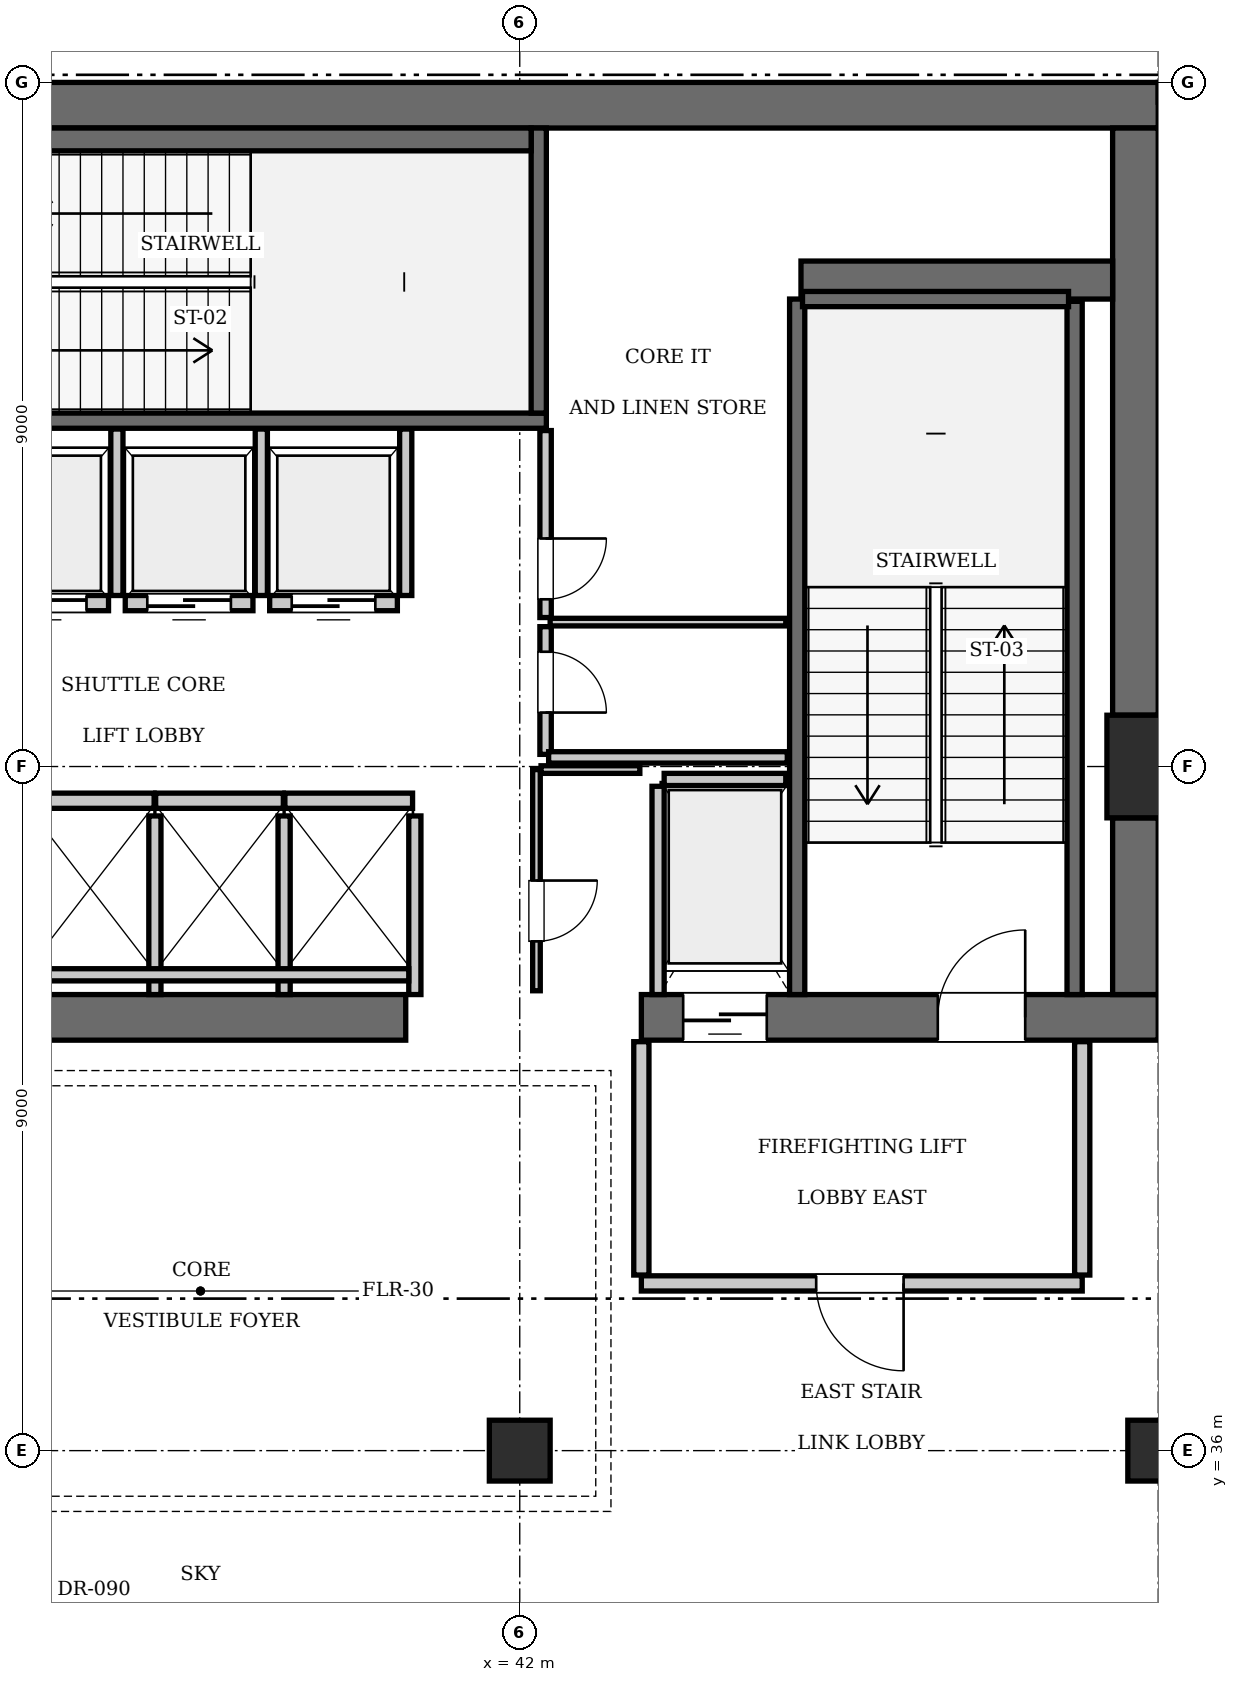
"""IFC4 building model, lengths in metres.
Left out: names, types, materials, properties, quantities, classifications, styles, units other than length and angle.
Written with IfcOpenShell. Run it as: python <this file> out.ifc"""

import sys

from ifc_helpers import new_model, si_unit, direction, frame, frame_2d, origin, origin_2d, place, context, subcontext, project, spatial, rectangle, extrude, element, fill, save


model = new_model("IFC4")
c1 = context("Model", 3, precision=1e-05, world=origin(), true_north=direction((0.0, 1.0)))
c2 = subcontext(c1, "Body", "Model", "MODEL_VIEW")
j1 = project(units=[si_unit("LENGTHUNIT", "METRE"), si_unit("PLANEANGLEUNIT", "RADIAN")], contexts=[c1])
p1 = place(None, origin())
s1 = spatial("IfcSite", under=j1, at=p1, CompositionType="ELEMENT")
p2 = place(p1, origin())
s2 = spatial("IfcBuilding", under=s1, at=p2, CompositionType="ELEMENT")
p3 = place(p2, frame((0.0, 0.0, 345.1)))
s3 = spatial("IfcBuildingStorey", under=s2, at=p3, CompositionType="ELEMENT", Elevation=345.1)
p4 = place(p3, frame((50.4, 45.0, 0.0), z_axis=(0.0, 0.0, 1.0), x_axis=(1.0, 0.0, 0.0)))
e1 = element("IfcColumn", 1, at=p4, inside=s3, PredefinedType="COLUMN", context=c2, shape_type="SweptSolid", body=[
    extrude(rectangle(XDim=1.35, YDim=1.35, at=origin_2d()), origin(), (0.0, 0.0, 1.0), 4.55),
])
p5 = place(p3, frame((25.2, 53.7, 0.0), z_axis=(0.0, 0.0, 1.0), x_axis=(1.0, 0.0, 0.0)))
e2 = element("IfcWall", 2, at=p5, inside=s3, PredefinedType="SHEAR", context=c2, shape_type="SweptSolid", body=[
    extrude(rectangle(XDim=25.2, YDim=0.6, at=frame_2d((12.6, 0.0))), origin(), (0.0, 0.0, 1.0), 4.55),
])
p6 = place(p3, frame((35.1, 41.7, 0.0), z_axis=(0.0, 0.0, 1.0), x_axis=(1.0, 0.0, 0.0)))
e3 = element("IfcWall", 3, at=p6, inside=s3, PredefinedType="SHEAR", context=c2, shape_type="SweptSolid", body=[
    extrude(rectangle(XDim=5.4, YDim=0.6, at=frame_2d((2.7, 0.0))), origin(), (0.0, 0.0, 1.0), 4.55),
])
p7 = place(p3, frame((43.6, 41.7, 0.0), z_axis=(0.0, 0.0, 1.0), x_axis=(1.0, 0.0, 0.0)))
e4 = element("IfcWall", 4, at=p7, inside=s3, PredefinedType="SHEAR", context=c2, shape_type="SweptSolid", body=[
    extrude(rectangle(XDim=6.8, YDim=0.6, at=frame_2d((3.4, 0.0))), origin(), (0.0, 0.0, 1.0), 4.55),
])
p8 = place(p7, frame((3.9, 0.0, 0.0)))
e5 = element("IfcOpeningElement", 5, at=p8, cuts=e4, PredefinedType="OPENING", context=c2, shape_type="SweptSolid", body=[
    extrude(rectangle(XDim=1.15, YDim=2.15, at=frame_2d((0.575, 1.075))), frame((0.0, 0.31, 0.0), z_axis=(0.0, -1.0, 0.0), x_axis=(1.0, 0.0, 0.0)), (0.0, 0.0, 1.0), 0.62),
])
p9 = place(p7, frame((0.55, 0.0, 0.0)))
e6 = element("IfcOpeningElement", 6, at=p9, cuts=e4, PredefinedType="OPENING", context=c2, shape_type="SweptSolid", body=[
    extrude(rectangle(XDim=1.1, YDim=2.2, at=frame_2d((0.55, 1.1))), frame((0.0, 0.31, 0.0), z_axis=(0.0, -1.0, 0.0), x_axis=(1.0, 0.0, 0.0)), (0.0, 0.0, 1.0), 0.62),
])
p10 = place(p3, frame((50.1, 42.0, 0.0), z_axis=(0.0, 0.0, 1.0), x_axis=(0.0, 1.0, 0.0)))
e7 = element("IfcWall", 7, at=p10, inside=s3, PredefinedType="SHEAR", context=c2, shape_type="SweptSolid", body=[
    extrude(rectangle(XDim=2.325, YDim=0.6, at=frame_2d((1.163, 0.0))), origin(), (0.0, 0.0, 1.0), 4.55),
])
p11 = place(p3, frame((50.1, 45.675, 0.0), z_axis=(0.0, 0.0, 1.0), x_axis=(0.0, 1.0, 0.0)))
e8 = element("IfcWall", 8, at=p11, inside=s3, PredefinedType="SHEAR", context=c2, shape_type="SweptSolid", body=[
    extrude(rectangle(XDim=7.725, YDim=0.6, at=frame_2d((3.862, 0.0))), origin(), (0.0, 0.0, 1.0), 4.55),
])
p12 = place(p3, frame((45.7, 51.4, 0.0), z_axis=(0.0, 0.0, 1.0), x_axis=(1.0, 0.0, 0.0)))
e9 = element("IfcWall", 9, at=p12, inside=s3, PredefinedType="SHEAR", context=c2, shape_type="SweptSolid", body=[
    extrude(rectangle(XDim=4.1, YDim=0.5, at=frame_2d((2.05, 0.0))), origin(), (0.0, 0.0, 1.0), 4.55),
])
for number, where, z_axis, x_axis in (
    (10, (42.0, 36.0, 0.0), (0.0, 0.0, 1.0), (1.0, 0.0, 0.0)),
    (11, (50.4, 36.0, 0.0), (0.0, 0.0, 1.0), (1.0, 0.0, 0.0)),
):
    element("IfcColumn", number, at=place(p3, frame(where, z_axis=z_axis, x_axis=x_axis)), inside=s3, PredefinedType="COLUMN", context=c2, shape_type="SweptSolid", body=[
        extrude(rectangle(XDim=0.8, YDim=0.8, at=origin_2d()), origin(), (0.0, 0.0, 1.0), 4.55),
    ])
p13 = place(p3, frame((33.25, 49.55, 0.0), z_axis=(0.0, 0.0, 1.0), x_axis=(1.0, 0.0, 0.0)))
e12 = element("IfcWall", 12, at=p13, inside=s3, PredefinedType="SOLIDWALL", context=c2, shape_type="SweptSolid", body=[
    extrude(rectangle(XDim=9.1, YDim=0.2, at=frame_2d((4.55, 0.0))), origin(), (0.0, 0.0, 1.0), 4.31),
])
p14 = place(p3, frame((42.25, 49.65, 0.0), z_axis=(0.0, 0.0, 1.0), x_axis=(0.0, 1.0, 0.0)))
e13 = element("IfcWall", 13, at=p14, inside=s3, PredefinedType="SOLIDWALL", context=c2, shape_type="SweptSolid", body=[
    extrude(rectangle(XDim=3.75, YDim=0.2, at=frame_2d((1.875, 0.0))), origin(), (0.0, 0.0, 1.0), 4.31),
])
p15 = place(p3, frame((33.45, 53.25, 0.0), z_axis=(0.0, 0.0, 1.0), x_axis=(1.0, 0.0, 0.0)))
e14 = element("IfcWall", 14, at=p15, inside=s3, PredefinedType="SOLIDWALL", context=c2, shape_type="SweptSolid", body=[
    extrude(rectangle(XDim=8.7, YDim=0.3, at=frame_2d((4.35, 0.0))), origin(), (0.0, 0.0, 1.0), 4.31),
])
p16 = place(p3, frame((45.65, 42.0, 0.0), z_axis=(0.0, 0.0, 1.0), x_axis=(0.0, 1.0, 0.0)))
e15 = element("IfcWall", 15, at=p16, inside=s3, PredefinedType="SOLIDWALL", context=c2, shape_type="SweptSolid", body=[
    extrude(rectangle(XDim=9.15, YDim=0.2, at=frame_2d((4.575, 0.0))), origin(), (0.0, 0.0, 1.0), 4.31),
])
p17 = place(p3, frame((49.3, 42.0, 0.0), z_axis=(0.0, 0.0, 1.0), x_axis=(0.0, 1.0, 0.0)))
e16 = element("IfcWall", 16, at=p17, inside=s3, PredefinedType="SOLIDWALL", context=c2, shape_type="SweptSolid", body=[
    extrude(rectangle(XDim=9.12, YDim=0.2, at=frame_2d((4.56, 0.0))), origin(), (0.0, 0.0, 1.0), 4.31),
])
p18 = place(p3, frame((45.72, 51.15, 0.0), z_axis=(0.0, 0.0, 1.0), x_axis=(1.0, 0.0, 0.0)))
e17 = element("IfcWall", 17, at=p18, inside=s3, PredefinedType="SOLIDWALL", context=c2, shape_type="SweptSolid", body=[
    extrude(rectangle(XDim=3.5, YDim=0.2, at=frame_2d((1.75, 0.0))), origin(), (0.0, 0.0, 1.0), 4.31),
])
for number, where, z_axis, x_axis in (
    (18, (35.51, 44.55, 0.0), (0.0, 0.0, 1.0), (1.0, 0.0, 0.0)),
    (19, (37.21, 44.55, 0.0), (0.0, 0.0, 1.0), (1.0, 0.0, 0.0)),
):
    element("IfcWall", number, at=place(p3, frame(where, z_axis=z_axis, x_axis=x_axis)), inside=s3, PredefinedType="SOLIDWALL", context=c2, shape_type="SweptSolid", body=[
        extrude(rectangle(XDim=1.68, YDim=0.2, at=frame_2d((0.84, 0.0))), origin(), (0.0, 0.0, 1.0), 4.31),
    ])
p19 = place(p3, frame((38.91, 44.55, 0.0), z_axis=(0.0, 0.0, 1.0), x_axis=(1.0, 0.0, 0.0)))
e20 = element("IfcWall", 20, at=p19, inside=s3, PredefinedType="SOLIDWALL", context=c2, shape_type="SweptSolid", body=[
    extrude(rectangle(XDim=1.68, YDim=0.2, at=frame_2d((0.84, 0.0))), origin(), (0.0, 0.0, 1.0), 4.31),
])
p20 = place(p3, frame((34.91, 47.15, 0.0), z_axis=(0.0, 0.0, 1.0), x_axis=(1.0, 0.0, 0.0)))
e21 = element("IfcWall", 21, at=p20, inside=s3, PredefinedType="SOLIDWALL", context=c2, shape_type="SweptSolid", body=[
    extrude(rectangle(XDim=1.68, YDim=0.2, at=frame_2d((0.84, 0.0))), origin(), (0.0, 0.0, 1.0), 4.31),
])
p21 = place(p20, frame((0.29, 0.0, 0.0)))
e22 = element("IfcOpeningElement", 22, at=p21, cuts=e21, PredefinedType="OPENING", context=c2, shape_type="SweptSolid", body=[
    extrude(rectangle(XDim=1.1, YDim=2.2, at=frame_2d((0.55, 1.1))), frame((0.0, 0.11, 0.0), z_axis=(0.0, -1.0, 0.0), x_axis=(1.0, 0.0, 0.0)), (0.0, 0.0, 1.0), 0.22),
])
p22 = place(p3, frame((36.81, 47.15, 0.0), z_axis=(0.0, 0.0, 1.0), x_axis=(1.0, 0.0, 0.0)))
e23 = element("IfcWall", 23, at=p22, inside=s3, PredefinedType="SOLIDWALL", context=c2, shape_type="SweptSolid", body=[
    extrude(rectangle(XDim=1.68, YDim=0.2, at=frame_2d((0.84, 0.0))), origin(), (0.0, 0.0, 1.0), 4.31),
])
p23 = place(p22, frame((0.29, 0.0, 0.0)))
e24 = element("IfcOpeningElement", 24, at=p23, cuts=e23, PredefinedType="OPENING", context=c2, shape_type="SweptSolid", body=[
    extrude(rectangle(XDim=1.1, YDim=2.2, at=frame_2d((0.55, 1.1))), frame((0.0, 0.11, 0.0), z_axis=(0.0, -1.0, 0.0), x_axis=(1.0, 0.0, 0.0)), (0.0, 0.0, 1.0), 0.22),
])
p24 = place(p3, frame((38.71, 47.15, 0.0), z_axis=(0.0, 0.0, 1.0), x_axis=(1.0, 0.0, 0.0)))
e25 = element("IfcWall", 25, at=p24, inside=s3, PredefinedType="SOLIDWALL", context=c2, shape_type="SweptSolid", body=[
    extrude(rectangle(XDim=1.68, YDim=0.2, at=frame_2d((0.84, 0.0))), origin(), (0.0, 0.0, 1.0), 4.31),
])
p25 = place(p24, frame((0.29, 0.0, 0.0)))
e26 = element("IfcOpeningElement", 26, at=p25, cuts=e25, PredefinedType="OPENING", context=c2, shape_type="SweptSolid", body=[
    extrude(rectangle(XDim=1.1, YDim=2.2, at=frame_2d((0.55, 1.1))), frame((0.0, 0.11, 0.0), z_axis=(0.0, -1.0, 0.0), x_axis=(1.0, 0.0, 0.0)), (0.0, 0.0, 1.0), 0.22),
])
p26 = place(p3, frame((43.9, 44.83, 0.0), z_axis=(0.0, 0.0, 1.0), x_axis=(1.0, 0.0, 0.0)))
e27 = element("IfcWall", 27, at=p26, inside=s3, PredefinedType="SOLIDWALL", context=c2, shape_type="SweptSolid", body=[
    extrude(rectangle(XDim=1.6, YDim=0.16, at=frame_2d((0.8, 0.0))), origin(), (0.0, 0.0, 1.0), 4.31),
])
p27 = place(p3, frame((43.82, 42.0, 0.0), z_axis=(0.0, 0.0, 1.0), x_axis=(0.0, 1.0, 0.0)))
e28 = element("IfcWall", 28, at=p27, inside=s3, PredefinedType="SOLIDWALL", context=c2, shape_type="SweptSolid", body=[
    extrude(rectangle(XDim=2.74, YDim=0.16, at=frame_2d((1.37, 0.0))), origin(), (0.0, 0.0, 1.0), 4.31),
])
for number, where, z_axis, x_axis in (
    (29, (37.2, 42.0, 0.0), (0.0, 0.0, 1.0), (0.0, 1.0, 0.0)),
    (30, (38.9, 42.0, 0.0), (0.0, 0.0, 1.0), (0.0, 1.0, 0.0)),
    (31, (40.62, 42.0, 0.0), (0.0, 0.0, 1.0), (0.0, 1.0, 0.0)),
):
    element("IfcWall", number, at=place(p3, frame(where, z_axis=z_axis, x_axis=x_axis)), inside=s3, PredefinedType="SOLIDWALL", context=c2, shape_type="SweptSolid", body=[
        extrude(rectangle(XDim=2.35, YDim=0.16, at=frame_2d((1.175, 0.0))), origin(), (0.0, 0.0, 1.0), 4.31),
    ])
p28 = place(p3, frame((35.52, 42.26, 0.0), z_axis=(0.0, 0.0, 1.0), x_axis=(1.0, 0.0, 0.0)))
e32 = element("IfcWall", 32, at=p28, inside=s3, PredefinedType="SOLIDWALL", context=c2, shape_type="SweptSolid", body=[
    extrude(rectangle(XDim=5.02, YDim=0.16, at=frame_2d((2.51, 0.0))), origin(), (0.0, 0.0, 1.0), 4.31),
])
for number, where, z_axis, x_axis in (
    (33, (36.7, 47.25, 0.0), (0.0, 0.0, 1.0), (0.0, 1.0, 0.0)),
    (34, (38.6, 47.25, 0.0), (0.0, 0.0, 1.0), (0.0, 1.0, 0.0)),
    (35, (40.5, 47.25, 0.0), (0.0, 0.0, 1.0), (0.0, 1.0, 0.0)),
):
    element("IfcWall", number, at=place(p3, frame(where, z_axis=z_axis, x_axis=x_axis)), inside=s3, PredefinedType="SOLIDWALL", context=c2, shape_type="SweptSolid", body=[
        extrude(rectangle(XDim=2.19, YDim=0.16, at=frame_2d((1.095, 0.0))), origin(), (0.0, 0.0, 1.0), 4.31),
    ])
p29 = place(p3, frame((43.6, 38.2, 0.0), z_axis=(0.0, 0.0, 1.0), x_axis=(1.0, 0.0, 0.0)))
e36 = element("IfcWall", 36, at=p29, inside=s3, PredefinedType="PARTITIONING", context=c2, shape_type="SweptSolid", body=[
    extrude(rectangle(XDim=5.8, YDim=0.2, at=frame_2d((2.9, 0.0))), origin(), (0.0, 0.0, 1.0), 4.31),
])
p30 = place(p29, frame((2.3, 0.0, 0.0)))
e37 = element("IfcOpeningElement", 37, at=p30, cuts=e36, PredefinedType="OPENING", context=c2, shape_type="SweptSolid", body=[
    extrude(rectangle(XDim=1.15, YDim=2.15, at=frame_2d((0.575, 1.075))), frame((0.0, 0.11, 0.0), z_axis=(0.0, -1.0, 0.0), x_axis=(1.0, 0.0, 0.0)), (0.0, 0.0, 1.0), 0.22),
])
for number, where, z_axis, x_axis in (
    (38, (43.6, 38.31, 0.0), (0.0, 0.0, 1.0), (0.0, 1.0, 0.0)),
    (39, (49.4, 38.31, 0.0), (0.0, 0.0, 1.0), (0.0, 1.0, 0.0)),
):
    element("IfcWall", number, at=place(p3, frame(where, z_axis=z_axis, x_axis=x_axis)), inside=s3, PredefinedType="PARTITIONING", context=c2, shape_type="SweptSolid", body=[
        extrude(rectangle(XDim=3.07, YDim=0.2, at=frame_2d((1.535, 0.0))), origin(), (0.0, 0.0, 1.0), 4.31),
    ])
p31 = place(p3, frame((42.22, 42.05, 0.0), z_axis=(0.0, 0.0, 1.0), x_axis=(0.0, 1.0, 0.0)))
e40 = element("IfcWall", 40, at=p31, inside=s3, PredefinedType="PARTITIONING", context=c2, shape_type="SweptSolid", body=[
    extrude(rectangle(XDim=2.91, YDim=0.1, at=frame_2d((1.455, 0.0))), origin(), (0.0, 0.0, 1.0), 4.31),
])
p32 = place(p31, frame((0.65, 0.0, 0.0)))
e41 = element("IfcOpeningElement", 41, at=p32, cuts=e40, PredefinedType="OPENING", context=c2, shape_type="SweptSolid", body=[
    extrude(rectangle(XDim=0.8, YDim=2.05, at=frame_2d((0.4, 1.025))), frame((0.0, 0.06, 0.0), z_axis=(0.0, -1.0, 0.0), x_axis=(1.0, 0.0, 0.0)), (0.0, 0.0, 1.0), 0.12),
])
p33 = place(p3, frame((42.28, 44.96, 0.0), z_axis=(0.0, 0.0, 1.0), x_axis=(1.0, 0.0, 0.0)))
e42 = element("IfcWall", 42, at=p33, inside=s3, PredefinedType="PARTITIONING", context=c2, shape_type="SweptSolid", body=[
    extrude(rectangle(XDim=1.3, YDim=0.1, at=frame_2d((0.65, 0.0))), origin(), (0.0, 0.0, 1.0), 4.31),
])
p34 = place(p3, frame((42.34, 45.16, 0.0), z_axis=(0.0, 0.0, 1.0), x_axis=(0.0, 1.0, 0.0)))
e43 = element("IfcWall", 43, at=p34, inside=s3, PredefinedType="PARTITIONING", context=c2, shape_type="SweptSolid", body=[
    extrude(rectangle(XDim=1.68, YDim=0.15, at=frame_2d((0.84, 0.0))), origin(), (0.0, 0.0, 1.0), 4.31),
])
p35 = place(p34, frame((0.55, 0.0, 0.0)))
e44 = element("IfcOpeningElement", 44, at=p35, cuts=e43, PredefinedType="OPENING", context=c2, shape_type="SweptSolid", body=[
    extrude(rectangle(XDim=0.8, YDim=2.05, at=frame_2d((0.4, 1.025))), frame((0.0, 0.085, 0.0), z_axis=(0.0, -1.0, 0.0), x_axis=(1.0, 0.0, 0.0)), (0.0, 0.0, 1.0), 0.17),
])
p36 = place(p3, frame((42.34, 46.96, 0.0), z_axis=(0.0, 0.0, 1.0), x_axis=(0.0, 1.0, 0.0)))
e45 = element("IfcWall", 45, at=p36, inside=s3, PredefinedType="PARTITIONING", context=c2, shape_type="SweptSolid", body=[
    extrude(rectangle(XDim=2.46, YDim=0.15, at=frame_2d((1.23, 0.0))), origin(), (0.0, 0.0, 1.0), 4.31),
])
p37 = place(p36, frame((0.24, 0.0, 0.0)))
e46 = element("IfcOpeningElement", 46, at=p37, cuts=e45, PredefinedType="OPENING", context=c2, shape_type="SweptSolid", body=[
    extrude(rectangle(XDim=0.8, YDim=2.05, at=frame_2d((0.4, 1.025))), frame((0.0, 0.085, 0.0), z_axis=(0.0, -1.0, 0.0), x_axis=(1.0, 0.0, 0.0)), (0.0, 0.0, 1.0), 0.17),
])
p38 = place(p3, frame((42.4, 46.9, 0.0), z_axis=(0.0, 0.0, 1.0), x_axis=(1.0, 0.0, 0.0)))
e47 = element("IfcWall", 47, at=p38, inside=s3, PredefinedType="PARTITIONING", context=c2, shape_type="SweptSolid", body=[
    extrude(rectangle(XDim=3.1, YDim=0.1, at=frame_2d((1.55, 0.0))), origin(), (0.0, 0.0, 1.0), 4.31),
])
p39 = place(p3, frame((42.38, 45.12, 0.0), z_axis=(0.0, 0.0, 1.0), x_axis=(1.0, 0.0, 0.0)))
e48 = element("IfcWall", 48, at=p39, inside=s3, PredefinedType="PARTITIONING", context=c2, shape_type="SweptSolid", body=[
    extrude(rectangle(XDim=3.14, YDim=0.15, at=frame_2d((1.57, 0.0))), origin(), (0.0, 0.0, 1.0), 4.31),
])
p40 = place(p8, origin())
e49 = element("IfcDoor", 49, at=p40, inside=s3, OperationType="SINGLE_SWING_RIGHT", PredefinedType="DOOR", context=c2, shape_type="SweptSolid", body=[
    extrude(rectangle(XDim=1.15, YDim=2.15, at=frame_2d((0.575, 1.075))), frame((0.0, 0.025, 0.0), z_axis=(0.0, -1.0, 0.0), x_axis=(1.0, 0.0, 0.0)), (0.0, 0.0, 1.0), 0.05),
])
fill(e5, e49)
p41 = place(p21, frame((1.1, 0.0, 0.0), z_axis=(0.0, 0.0, 1.0), x_axis=(-1.0, 0.0, 0.0)))
e50 = element("IfcDoor", 50, at=p41, inside=s3, OperationType="SLIDING_TO_RIGHT", PredefinedType="DOOR", context=c2, shape_type="SweptSolid", body=[
    extrude(rectangle(XDim=1.1, YDim=2.2, at=frame_2d((0.55, 1.1))), frame((0.0, 0.025, 0.0), z_axis=(0.0, -1.0, 0.0), x_axis=(1.0, 0.0, 0.0)), (0.0, 0.0, 1.0), 0.05),
])
fill(e22, e50)
p42 = place(p23, frame((1.1, 0.0, 0.0), z_axis=(0.0, 0.0, 1.0), x_axis=(-1.0, 0.0, 0.0)))
e51 = element("IfcDoor", 51, at=p42, inside=s3, OperationType="SLIDING_TO_RIGHT", PredefinedType="DOOR", context=c2, shape_type="SweptSolid", body=[
    extrude(rectangle(XDim=1.1, YDim=2.2, at=frame_2d((0.55, 1.1))), frame((0.0, 0.025, 0.0), z_axis=(0.0, -1.0, 0.0), x_axis=(1.0, 0.0, 0.0)), (0.0, 0.0, 1.0), 0.05),
])
fill(e24, e51)
p43 = place(p25, frame((1.1, 0.0, 0.0), z_axis=(0.0, 0.0, 1.0), x_axis=(-1.0, 0.0, 0.0)))
e52 = element("IfcDoor", 52, at=p43, inside=s3, OperationType="SLIDING_TO_RIGHT", PredefinedType="DOOR", context=c2, shape_type="SweptSolid", body=[
    extrude(rectangle(XDim=1.1, YDim=2.2, at=frame_2d((0.55, 1.1))), frame((0.0, 0.025, 0.0), z_axis=(0.0, -1.0, 0.0), x_axis=(1.0, 0.0, 0.0)), (0.0, 0.0, 1.0), 0.05),
])
fill(e26, e52)
p44 = place(p9, frame((1.1, 0.0, 0.0), z_axis=(0.0, 0.0, 1.0), x_axis=(-1.0, 0.0, 0.0)))
e53 = element("IfcDoor", 53, at=p44, inside=s3, OperationType="SLIDING_TO_LEFT", PredefinedType="DOOR", context=c2, shape_type="SweptSolid", body=[
    extrude(rectangle(XDim=1.1, YDim=2.2, at=frame_2d((0.55, 1.1))), frame((0.0, 0.025, 0.0), z_axis=(0.0, -1.0, 0.0), x_axis=(1.0, 0.0, 0.0)), (0.0, 0.0, 1.0), 0.05),
])
fill(e6, e53)
p45 = place(p30, frame((1.15, 0.0, 0.0), z_axis=(0.0, 0.0, 1.0), x_axis=(-1.0, 0.0, 0.0)))
e54 = element("IfcDoor", 54, at=p45, inside=s3, OperationType="SINGLE_SWING_LEFT", PredefinedType="DOOR", context=c2, shape_type="SweptSolid", body=[
    extrude(rectangle(XDim=1.15, YDim=2.15, at=frame_2d((0.575, 1.075))), frame((0.0, 0.025, 0.0), z_axis=(0.0, -1.0, 0.0), x_axis=(1.0, 0.0, 0.0)), (0.0, 0.0, 1.0), 0.05),
])
fill(e37, e54)
p46 = place(p32, frame((0.8, 0.0, 0.0), z_axis=(0.0, 0.0, 1.0), x_axis=(-1.0, 0.0, 0.0)))
e55 = element("IfcDoor", 55, at=p46, inside=s3, OperationType="SINGLE_SWING_LEFT", PredefinedType="DOOR", context=c2, shape_type="SweptSolid", body=[
    extrude(rectangle(XDim=0.8, YDim=2.05, at=frame_2d((0.4, 1.025))), frame((0.0, 0.025, 0.0), z_axis=(0.0, -1.0, 0.0), x_axis=(1.0, 0.0, 0.0)), (0.0, 0.0, 1.0), 0.05),
])
fill(e41, e55)
p47 = place(p35, frame((0.8, 0.0, 0.0), z_axis=(0.0, 0.0, 1.0), x_axis=(-1.0, 0.0, 0.0)))
e56 = element("IfcDoor", 56, at=p47, inside=s3, OperationType="SINGLE_SWING_RIGHT", PredefinedType="DOOR", context=c2, shape_type="SweptSolid", body=[
    extrude(rectangle(XDim=0.8, YDim=2.05, at=frame_2d((0.4, 1.025))), frame((0.0, 0.025, 0.0), z_axis=(0.0, -1.0, 0.0), x_axis=(1.0, 0.0, 0.0)), (0.0, 0.0, 1.0), 0.05),
])
fill(e44, e56)
p48 = place(p37, frame((0.8, 0.0, 0.0), z_axis=(0.0, 0.0, 1.0), x_axis=(-1.0, 0.0, 0.0)))
e57 = element("IfcDoor", 57, at=p48, inside=s3, OperationType="SINGLE_SWING_LEFT", PredefinedType="DOOR", context=c2, shape_type="SweptSolid", body=[
    extrude(rectangle(XDim=0.8, YDim=2.05, at=frame_2d((0.4, 1.025))), frame((0.0, 0.025, 0.0), z_axis=(0.0, -1.0, 0.0), x_axis=(1.0, 0.0, 0.0)), (0.0, 0.0, 1.0), 0.05),
])
fill(e46, e57)
save(model, sys.argv[1])
